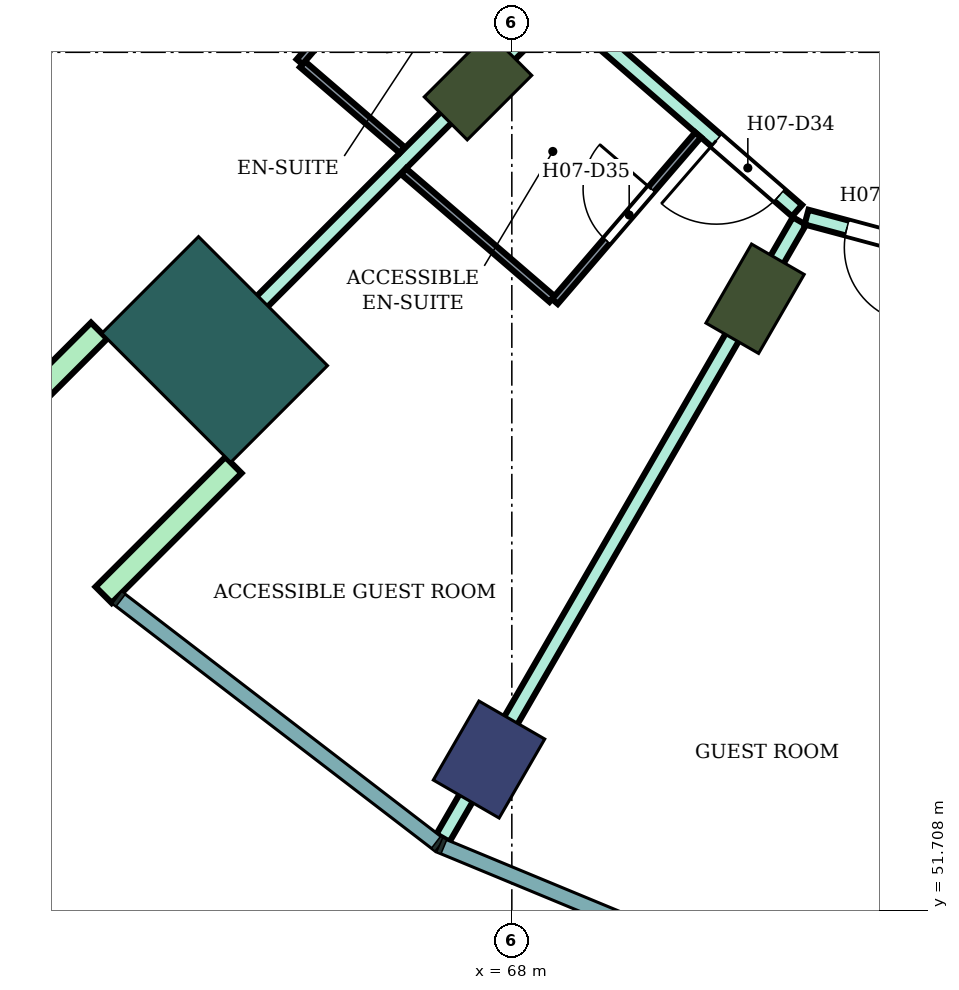
"""IFC4 building model, lengths in metres.
Left out: names, types, materials, properties, quantities, classifications, styles, units other than length and angle.
Written with IfcOpenShell. Run it as: python <this file> out.ifc"""

import sys

from ifc_helpers import new_model, si_unit, direction, frame, frame_2d, origin, origin_2d, place, context, subcontext, project, spatial, rectangle, extrude, element, fill, save


model = new_model("IFC4")
c1 = context("Model", 3, precision=1e-05, world=origin(), true_north=direction((0.0, 1.0)))
c2 = subcontext(c1, "Body", "Model", "MODEL_VIEW")
j1 = project(units=[si_unit("LENGTHUNIT", "METRE"), si_unit("PLANEANGLEUNIT", "RADIAN")], contexts=[c1])
p1 = place(None, origin())
s1 = spatial("IfcSite", under=j1, at=p1, CompositionType="ELEMENT")
p2 = place(p1, origin())
s2 = spatial("IfcBuilding", under=s1, at=p2, CompositionType="ELEMENT")
p3 = place(p2, frame((0.0, 0.0, 105.2)))
s3 = spatial("IfcBuildingStorey", under=s2, at=p3, CompositionType="ELEMENT", Elevation=105.2)
p4 = place(p3, frame((67.7, 53.696, 0.0), z_axis=(0.0, 0.0, 1.0), x_axis=(-0.5, -0.866025403784, 0.0)))
e1 = element("IfcColumn", 1, at=p4, inside=s3, PredefinedType="COLUMN", context=c2, shape_type="SweptSolid", body=[
    extrude(rectangle(XDim=1.2, YDim=1.0, at=origin_2d()), origin(), (0.0, 0.0, 1.0), 3.8),
])
for number, where, z_axis, x_axis in (
    (2, (67.555, 62.555, 0.0), (0.0, 0.0, 1.0), (-0.707, -0.707, 0.0)),
    (3, (71.2, 59.758, 0.0), (0.0, 0.0, 1.0), (-0.5, -0.866, 0.0)),
):
    element("IfcColumn", number, at=place(p3, frame(where, z_axis=z_axis, x_axis=x_axis)), inside=s3, PredefinedType="COLUMN", context=c2, shape_type="SweptSolid", body=[
        extrude(rectangle(XDim=1.2, YDim=0.8, at=origin_2d()), origin(), (0.0, 0.0, 1.0), 3.8),
    ])
p5 = place(p3, frame((64.09, 59.09, 0.0), z_axis=(0.0, 0.0, 1.0), x_axis=(-0.707106781187, -0.707106781187, 0.0)))
e4 = element("IfcColumn", 4, at=p5, inside=s3, PredefinedType="COLUMN", context=c2, shape_type="SweptSolid", body=[
    extrude(rectangle(XDim=1.8, YDim=2.4, at=origin_2d()), origin(), (0.0, 0.0, 1.0), 3.8),
])
for number, where, z_axis, x_axis in (
    (5, (62.57, 59.338, 0.0), (0.0, 0.0, 1.0), (-0.707, -0.707, 0.0)),
    (6, (64.338, 57.57, 0.0), (0.0, 0.0, 1.0), (-0.707, -0.707, 0.0)),
):
    element("IfcWall", number, at=place(p3, frame(where, z_axis=z_axis, x_axis=x_axis)), inside=s3, PredefinedType="NOTDEFINED", context=c2, shape_type="SweptSolid", body=[
        extrude(rectangle(XDim=2.416, YDim=0.3, at=frame_2d((1.208, 0.0))), origin(), (0.0, 0.0, 1.0), 3.8),
    ])
p6 = place(p3, frame((63.592, 58.599, 0.0), z_axis=(0.0, 0.0, 1.0), x_axis=(0.707281009781, 0.706932509653, 0.0)))
e7 = element("IfcWall", 7, at=p6, inside=s3, PredefinedType="PARTITIONING", context=c2, shape_type="SweptSolid", body=[
    extrude(rectangle(XDim=7.005, YDim=0.2, at=frame_2d((3.503, 0.0))), origin(), (0.0, 0.0, 1.0), 3.35),
])
p7 = place(p3, frame((67.082, 64.972, 0.0), z_axis=(0.0, 0.0, 1.0), x_axis=(0.755033632617, -0.655686063309, 0.0)))
e8 = element("IfcWall", 8, at=p7, inside=s3, PredefinedType="PARTITIONING", context=c2, shape_type="SweptSolid", body=[
    extrude(rectangle(XDim=6.185, YDim=0.2, at=frame_2d((3.093, 0.0))), origin(), (0.0, 0.0, 1.0), 3.35),
])
p8 = place(p7, frame((4.778, 0.0, 0.0)))
e9 = element("IfcOpeningElement", 9, at=p8, cuts=e8, PredefinedType="OPENING", context=c2, shape_type="SweptSolid", body=[
    extrude(rectangle(XDim=1.1, YDim=2.1, at=frame_2d((0.55, 1.05))), frame((0.0, 0.11, 0.0), z_axis=(0.0, -1.0, 0.0), x_axis=(1.0, 0.0, 0.0)), (0.0, 0.0, 1.0), 0.22),
])
p9 = place(p3, frame((67.094, 52.663, 0.0), z_axis=(0.0, 0.0, 1.0), x_axis=(0.500236379769, 0.865888886841, 0.0)))
e10 = element("IfcWall", 10, at=p9, inside=s3, PredefinedType="PARTITIONING", context=c2, shape_type="SweptSolid", body=[
    extrude(rectangle(XDim=9.375, YDim=0.2, at=frame_2d((4.688, 0.0))), origin(), (0.0, 0.0, 1.0), 3.35),
])
p10 = place(p3, frame((71.877, 60.832, 0.0), z_axis=(0.0, 0.0, 1.0), x_axis=(0.965852509869, -0.259092510851, 0.0)))
e11 = element("IfcWall", 11, at=p10, inside=s3, PredefinedType="PARTITIONING", context=c2, shape_type="SweptSolid", body=[
    extrude(rectangle(XDim=8.32, YDim=0.2, at=frame_2d((4.16, 0.0))), origin(), (0.0, 0.0, 1.0), 3.35),
])
p11 = place(p10, frame((6.86, 0.0, 0.0)))
e12 = element("IfcOpeningElement", 12, at=p11, cuts=e11, PredefinedType="OPENING", context=c2, shape_type="SweptSolid", body=[
    extrude(rectangle(XDim=1.0, YDim=2.1, at=frame_2d((0.5, 1.05))), frame((0.0, 0.11, 0.0), z_axis=(0.0, -1.0, 0.0), x_axis=(1.0, 0.0, 0.0)), (0.0, 0.0, 1.0), 0.22),
])
p12 = place(p10, frame((0.55, 0.0, 0.0)))
e13 = element("IfcOpeningElement", 13, at=p12, cuts=e11, PredefinedType="OPENING", context=c2, shape_type="SweptSolid", body=[
    extrude(rectangle(XDim=1.0, YDim=2.1, at=frame_2d((0.5, 1.05))), frame((0.0, 0.11, 0.0), z_axis=(0.0, -1.0, 0.0), x_axis=(1.0, 0.0, 0.0)), (0.0, 0.0, 1.0), 0.22),
])
p13 = place(p3, frame((65.246, 62.842, 0.0), z_axis=(0.0, 0.0, 1.0), x_axis=(0.758030338995, -0.652219292234, 0.0)))
e14 = element("IfcWall", 14, at=p13, inside=s3, PredefinedType="PARTITIONING", context=c2, shape_type="SweptSolid", body=[
    extrude(rectangle(XDim=1.73, YDim=0.1, at=frame_2d((0.865, 0.0))), origin(), (0.0, 0.0, 1.0), 3.35),
])
p14 = place(p3, frame((65.208, 62.875, 0.0), z_axis=(0.0, 0.0, 1.0), x_axis=(0.65205430601, 0.758172264076, 0.0)))
e15 = element("IfcWall", 15, at=p14, inside=s3, PredefinedType="PARTITIONING", context=c2, shape_type="SweptSolid", body=[
    extrude(rectangle(XDim=2.8, YDim=0.1, at=frame_2d((1.4, 0.0))), origin(), (0.0, 0.0, 1.0), 3.35),
])
p15 = place(p14, frame((0.85, 0.0, 0.0)))
e16 = element("IfcOpeningElement", 16, at=p15, cuts=e15, PredefinedType="OPENING", context=c2, shape_type="SweptSolid", body=[
    extrude(rectangle(XDim=0.8, YDim=2.1, at=frame_2d((0.4, 1.05))), frame((0.0, 0.06, 0.0), z_axis=(0.0, -1.0, 0.0), x_axis=(1.0, 0.0, 0.0)), (0.0, 0.0, 1.0), 0.12),
])
p16 = place(p3, frame((66.576, 61.435, 0.0), z_axis=(0.0, 0.0, 1.0), x_axis=(0.757970550281, -0.652288774169, 0.0)))
e17 = element("IfcWall", 17, at=p16, inside=s3, PredefinedType="PARTITIONING", context=c2, shape_type="SweptSolid", body=[
    extrude(rectangle(XDim=2.576, YDim=0.1, at=frame_2d((1.288, 0.0))), origin(), (0.0, 0.0, 1.0), 3.35),
])
p17 = place(p3, frame((68.566, 59.722, 0.0), z_axis=(0.0, 0.0, 1.0), x_axis=(0.65193146671, 0.758277892803, 0.0)))
e18 = element("IfcWall", 18, at=p17, inside=s3, PredefinedType="PARTITIONING", context=c2, shape_type="SweptSolid", body=[
    extrude(rectangle(XDim=2.89, YDim=0.1, at=frame_2d((1.445, 0.0))), origin(), (0.0, 0.0, 1.0), 3.35),
])
p18 = place(p17, frame((1.05, 0.0, 0.0)))
e19 = element("IfcOpeningElement", 19, at=p18, cuts=e18, PredefinedType="OPENING", context=c2, shape_type="SweptSolid", body=[
    extrude(rectangle(XDim=0.9, YDim=2.1, at=frame_2d((0.45, 1.05))), frame((0.0, 0.06, 0.0), z_axis=(0.0, -1.0, 0.0), x_axis=(1.0, 0.0, 0.0)), (0.0, 0.0, 1.0), 0.12),
])
p19 = place(p12, frame((1.0, 0.0, 0.0), z_axis=(0.0, 0.0, 1.0), x_axis=(-1.0, 0.0, 0.0)))
e20 = element("IfcDoor", 20, at=p19, inside=s3, OperationType="SINGLE_SWING_LEFT", PredefinedType="DOOR", context=c2, shape_type="SweptSolid", body=[
    extrude(rectangle(XDim=1.0, YDim=2.1, at=frame_2d((0.5, 1.05))), frame((0.0, 0.025, 0.0), z_axis=(0.0, -1.0, 0.0), x_axis=(1.0, 0.0, 0.0)), (0.0, 0.0, 1.0), 0.05),
])
fill(e13, e20)
p20 = place(p8, frame((1.1, 0.0, 0.0), z_axis=(0.0, 0.0, 1.0), x_axis=(-1.0, 0.0, 0.0)))
e21 = element("IfcDoor", 21, at=p20, inside=s3, OperationType="SINGLE_SWING_RIGHT", PredefinedType="DOOR", context=c2, shape_type="SweptSolid", body=[
    extrude(rectangle(XDim=1.1, YDim=2.1, at=frame_2d((0.55, 1.05))), frame((0.0, 0.025, 0.0), z_axis=(0.0, -1.0, 0.0), x_axis=(1.0, 0.0, 0.0)), (0.0, 0.0, 1.0), 0.05),
])
fill(e9, e21)
p21 = place(p18, origin())
e22 = element("IfcDoor", 22, at=p21, inside=s3, OperationType="SINGLE_SWING_RIGHT", PredefinedType="DOOR", context=c2, shape_type="SweptSolid", body=[
    extrude(rectangle(XDim=0.9, YDim=2.1, at=frame_2d((0.45, 1.05))), frame((0.0, 0.025, 0.0), z_axis=(0.0, -1.0, 0.0), x_axis=(1.0, 0.0, 0.0)), (0.0, 0.0, 1.0), 0.05),
])
fill(e19, e22)
save(model, sys.argv[1])
